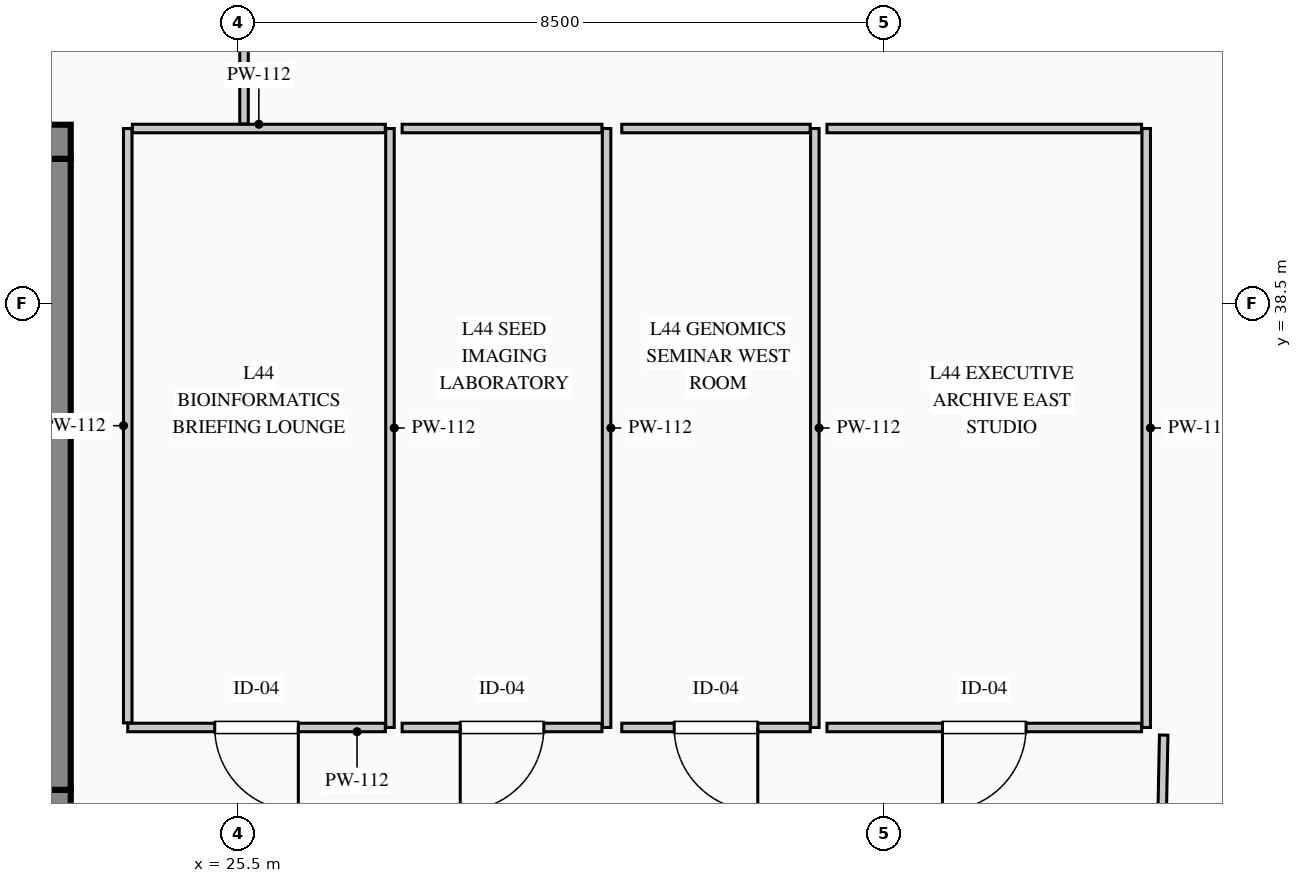
"""IFC4 building model, lengths in metres.
Left out: names, types, materials, properties, quantities, classifications, styles, units other than length and angle.
Written with IfcOpenShell. Run it as: python <this file> out.ifc"""

import sys

from ifc_helpers import new_model, si_unit, direction, frame, frame_2d, origin, place, context, subcontext, project, spatial, rectangle, extrude, element, fill, save


model = new_model("IFC4")
c1 = context("Model", 3, precision=1e-05, world=origin(), true_north=direction((0.0, 1.0)))
c2 = subcontext(c1, "Body", "Model", "MODEL_VIEW")
j1 = project(units=[si_unit("LENGTHUNIT", "METRE"), si_unit("PLANEANGLEUNIT", "RADIAN")], contexts=[c1])
p1 = place(None, origin())
s1 = spatial("IfcSite", under=j1, at=p1, CompositionType="ELEMENT")
p2 = place(p1, origin())
s2 = spatial("IfcBuilding", under=s1, at=p2, CompositionType="ELEMENT")
p3 = place(p2, frame((0.0, 0.0, 187.7)))
s3 = spatial("IfcBuildingStorey", under=s2, at=p3, CompositionType="ELEMENT", Elevation=187.7)
p4 = place(p3, frame((5.55, 40.625, 0.0), z_axis=(0.0, 0.0, 1.0), x_axis=(1.0, 0.0, 0.0)))
e1 = element("IfcWall", 1, at=p4, inside=s3, PredefinedType="SHEAR", context=c2, shape_type="SweptSolid", body=[
    extrude(rectangle(XDim=17.75, YDim=0.45, at=frame_2d((8.875, 0.0))), origin(), (0.0, 0.0, 1.0), 3.95),
])
p5 = place(p4, frame((15.895, 0.0, 0.0)))
e2 = element("IfcOpeningElement", 2, at=p5, cuts=e1, PredefinedType="OPENING", context=c2, shape_type="SweptSolid", body=[
    extrude(rectangle(XDim=1.18, YDim=2.25, at=frame_2d((0.59, 1.125))), frame((0.0, 0.235, 0.0), z_axis=(0.0, -1.0, 0.0), x_axis=(1.0, 0.0, 0.0)), (0.0, 0.0, 1.0), 0.47),
])
p6 = place(p3, frame((5.55, 31.875, 0.0), z_axis=(0.0, 0.0, 1.0), x_axis=(1.0, 0.0, 0.0)))
e3 = element("IfcWall", 3, at=p6, inside=s3, PredefinedType="SHEAR", context=c2, shape_type="SweptSolid", body=[
    extrude(rectangle(XDim=17.75, YDim=0.45, at=frame_2d((8.875, 0.0))), origin(), (0.0, 0.0, 1.0), 3.95),
])
p7 = place(p6, frame((3.1, 0.0, 0.0)))
e4 = element("IfcOpeningElement", 4, at=p7, cuts=e3, PredefinedType="OPENING", context=c2, shape_type="SweptSolid", body=[
    extrude(rectangle(XDim=1.2, YDim=2.2, at=frame_2d((0.6, 1.1))), frame((0.0, 0.235, 0.0), z_axis=(0.0, -1.0, 0.0), x_axis=(1.0, 0.0, 0.0)), (0.0, 0.0, 1.0), 0.47),
])
p8 = place(p6, frame((6.95, 0.0, 0.0)))
e5 = element("IfcOpeningElement", 5, at=p8, cuts=e3, PredefinedType="OPENING", context=c2, shape_type="SweptSolid", body=[
    extrude(rectangle(XDim=1.2, YDim=2.2, at=frame_2d((0.6, 1.1))), frame((0.0, 0.235, 0.0), z_axis=(0.0, -1.0, 0.0), x_axis=(1.0, 0.0, 0.0)), (0.0, 0.0, 1.0), 0.47),
])
p9 = place(p6, frame((8.8, 0.0, 0.0)))
e6 = element("IfcOpeningElement", 6, at=p9, cuts=e3, PredefinedType="OPENING", context=c2, shape_type="SweptSolid", body=[
    extrude(rectangle(XDim=1.15, YDim=2.2, at=frame_2d((0.575, 1.1))), frame((0.0, 0.235, 0.0), z_axis=(0.0, -1.0, 0.0), x_axis=(1.0, 0.0, 0.0)), (0.0, 0.0, 1.0), 0.47),
])
p10 = place(p6, frame((15.9, 0.0, 0.0)))
e7 = element("IfcOpeningElement", 7, at=p10, cuts=e3, PredefinedType="OPENING", context=c2, shape_type="SweptSolid", body=[
    extrude(rectangle(XDim=1.2, YDim=2.2, at=frame_2d((0.6, 1.1))), frame((0.0, 0.235, 0.0), z_axis=(0.0, -1.0, 0.0), x_axis=(1.0, 0.0, 0.0)), (0.0, 0.0, 1.0), 0.47),
])
p11 = place(p3, frame((23.075, 32.1, 0.0), z_axis=(0.0, 0.0, 1.0), x_axis=(0.0, 1.0, 0.0)))
e8 = element("IfcWall", 8, at=p11, inside=s3, PredefinedType="SHEAR", context=c2, shape_type="SweptSolid", body=[
    extrude(rectangle(XDim=8.3, YDim=0.45, at=frame_2d((4.15, 0.0))), origin(), (0.0, 0.0, 1.0), 3.95),
])
p12 = place(p3, frame((27.5, 40.8, 0.0), z_axis=(0.0, 0.0, 1.0), x_axis=(0.0, -1.0, 0.0)))
e9 = element("IfcWall", 9, at=p12, inside=s3, PredefinedType="PARTITIONING", context=c2, shape_type="SweptSolid", body=[
    extrude(rectangle(XDim=7.88, YDim=0.112, at=frame_2d((3.94, 0.0))), origin(), (0.0, 0.0, 1.0), 3.7),
])
p13 = place(p3, frame((27.439, 32.92, 0.0), z_axis=(0.0, 0.0, 1.0), x_axis=(-1.0, 0.0, 0.0)))
e10 = element("IfcWall", 10, at=p13, inside=s3, PredefinedType="PARTITIONING", context=c2, shape_type="SweptSolid", body=[
    extrude(rectangle(XDim=3.389, YDim=0.112, at=frame_2d((1.694, 0.0))), origin(), (0.0, 0.0, 1.0), 3.7),
])
p14 = place(p13, frame((1.145, 0.0, 0.0)))
e11 = element("IfcOpeningElement", 11, at=p14, cuts=e10, PredefinedType="OPENING", context=c2, shape_type="SweptSolid", body=[
    extrude(rectangle(XDim=1.1, YDim=2.2, at=frame_2d((0.55, 1.1))), frame((0.0, 0.066, 0.0), z_axis=(0.0, -1.0, 0.0), x_axis=(1.0, 0.0, 0.0)), (0.0, 0.0, 1.0), 0.132),
])
p15 = place(p3, frame((24.05, 32.981, 0.0), z_axis=(0.0, 0.0, 1.0), x_axis=(0.0, 1.0, 0.0)))
e12 = element("IfcWall", 12, at=p15, inside=s3, PredefinedType="PARTITIONING", context=c2, shape_type="SweptSolid", body=[
    extrude(rectangle(XDim=7.819, YDim=0.112, at=frame_2d((3.91, 0.0))), origin(), (0.0, 0.0, 1.0), 3.7),
])
p16 = place(p3, frame((24.111, 40.8, 0.0), z_axis=(0.0, 0.0, 1.0), x_axis=(1.0, 0.0, 0.0)))
e13 = element("IfcWall", 13, at=p16, inside=s3, PredefinedType="PARTITIONING", context=c2, shape_type="SweptSolid", body=[
    extrude(rectangle(XDim=3.328, YDim=0.112, at=frame_2d((1.664, 0.0))), origin(), (0.0, 0.0, 1.0), 3.7),
])
p17 = place(p3, frame((30.35, 40.8, 0.0), z_axis=(0.0, 0.0, 1.0), x_axis=(0.0, -1.0, 0.0)))
e14 = element("IfcWall", 14, at=p17, inside=s3, PredefinedType="PARTITIONING", context=c2, shape_type="SweptSolid", body=[
    extrude(rectangle(XDim=7.88, YDim=0.112, at=frame_2d((3.94, 0.0))), origin(), (0.0, 0.0, 1.0), 3.7),
])
p18 = place(p3, frame((30.289, 32.92, 0.0), z_axis=(0.0, 0.0, 1.0), x_axis=(-1.0, 0.0, 0.0)))
e15 = element("IfcWall", 15, at=p18, inside=s3, PredefinedType="PARTITIONING", context=c2, shape_type="SweptSolid", body=[
    extrude(rectangle(XDim=2.629, YDim=0.112, at=frame_2d((1.314, 0.0))), origin(), (0.0, 0.0, 1.0), 3.7),
])
p19 = place(p18, frame((0.764, 0.0, 0.0)))
e16 = element("IfcOpeningElement", 16, at=p19, cuts=e15, PredefinedType="OPENING", context=c2, shape_type="SweptSolid", body=[
    extrude(rectangle(XDim=1.1, YDim=2.2, at=frame_2d((0.55, 1.1))), frame((0.0, 0.066, 0.0), z_axis=(0.0, -1.0, 0.0), x_axis=(1.0, 0.0, 0.0)), (0.0, 0.0, 1.0), 0.132),
])
p20 = place(p3, frame((27.66, 40.8, 0.0), z_axis=(0.0, 0.0, 1.0), x_axis=(1.0, 0.0, 0.0)))
e17 = element("IfcWall", 17, at=p20, inside=s3, PredefinedType="PARTITIONING", context=c2, shape_type="SweptSolid", body=[
    extrude(rectangle(XDim=2.629, YDim=0.112, at=frame_2d((1.314, 0.0))), origin(), (0.0, 0.0, 1.0), 3.7),
])
p21 = place(p3, frame((33.09, 40.8, 0.0), z_axis=(0.0, 0.0, 1.0), x_axis=(0.0, -1.0, 0.0)))
e18 = element("IfcWall", 18, at=p21, inside=s3, PredefinedType="PARTITIONING", context=c2, shape_type="SweptSolid", body=[
    extrude(rectangle(XDim=7.88, YDim=0.112, at=frame_2d((3.94, 0.0))), origin(), (0.0, 0.0, 1.0), 3.7),
])
p22 = place(p3, frame((33.029, 32.92, 0.0), z_axis=(0.0, 0.0, 1.0), x_axis=(-1.0, 0.0, 0.0)))
e19 = element("IfcWall", 19, at=p22, inside=s3, PredefinedType="PARTITIONING", context=c2, shape_type="SweptSolid", body=[
    extrude(rectangle(XDim=2.479, YDim=0.112, at=frame_2d((1.24, 0.0))), origin(), (0.0, 0.0, 1.0), 3.7),
])
p23 = place(p22, frame((0.689, 0.0, 0.0)))
e20 = element("IfcOpeningElement", 20, at=p23, cuts=e19, PredefinedType="OPENING", context=c2, shape_type="SweptSolid", body=[
    extrude(rectangle(XDim=1.1, YDim=2.2, at=frame_2d((0.55, 1.1))), frame((0.0, 0.066, 0.0), z_axis=(0.0, -1.0, 0.0), x_axis=(1.0, 0.0, 0.0)), (0.0, 0.0, 1.0), 0.132),
])
p24 = place(p3, frame((30.55, 40.8, 0.0), z_axis=(0.0, 0.0, 1.0), x_axis=(1.0, 0.0, 0.0)))
e21 = element("IfcWall", 21, at=p24, inside=s3, PredefinedType="PARTITIONING", context=c2, shape_type="SweptSolid", body=[
    extrude(rectangle(XDim=2.479, YDim=0.112, at=frame_2d((1.24, 0.0))), origin(), (0.0, 0.0, 1.0), 3.7),
])
p25 = place(p3, frame((37.45, 40.8, 0.0), z_axis=(0.0, 0.0, 1.0), x_axis=(0.0, -1.0, 0.0)))
e22 = element("IfcWall", 22, at=p25, inside=s3, PredefinedType="PARTITIONING", context=c2, shape_type="SweptSolid", body=[
    extrude(rectangle(XDim=7.88, YDim=0.112, at=frame_2d((3.94, 0.0))), origin(), (0.0, 0.0, 1.0), 3.7),
])
p26 = place(p3, frame((37.389, 32.92, 0.0), z_axis=(0.0, 0.0, 1.0), x_axis=(-1.0, 0.0, 0.0)))
e23 = element("IfcWall", 23, at=p26, inside=s3, PredefinedType="PARTITIONING", context=c2, shape_type="SweptSolid", body=[
    extrude(rectangle(XDim=4.139, YDim=0.112, at=frame_2d((2.069, 0.0))), origin(), (0.0, 0.0, 1.0), 3.7),
])
p27 = place(p26, frame((1.52, 0.0, 0.0)))
e24 = element("IfcOpeningElement", 24, at=p27, cuts=e23, PredefinedType="OPENING", context=c2, shape_type="SweptSolid", body=[
    extrude(rectangle(XDim=1.1, YDim=2.2, at=frame_2d((0.55, 1.1))), frame((0.0, 0.066, 0.0), z_axis=(0.0, -1.0, 0.0), x_axis=(1.0, 0.0, 0.0)), (0.0, 0.0, 1.0), 0.132),
])
p28 = place(p3, frame((33.25, 40.8, 0.0), z_axis=(0.0, 0.0, 1.0), x_axis=(1.0, 0.0, 0.0)))
e25 = element("IfcWall", 25, at=p28, inside=s3, PredefinedType="PARTITIONING", context=c2, shape_type="SweptSolid", body=[
    extrude(rectangle(XDim=4.139, YDim=0.112, at=frame_2d((2.069, 0.0))), origin(), (0.0, 0.0, 1.0), 3.7),
])
p29 = place(p3, frame((37.599, 28.691, 0.0), z_axis=(0.0, 0.0, 1.0), x_axis=(0.019566997539, 0.999808547977, 0.0)))
e26 = element("IfcWall", 26, at=p29, inside=s3, PredefinedType="PARTITIONING", context=c2, shape_type="SweptSolid", body=[
    extrude(rectangle(XDim=4.13, YDim=0.112, at=frame_2d((2.065, 0.0))), origin(), (0.0, 0.0, 1.0), 3.7),
])
p30 = place(p29, frame((1.515, 0.0, 0.0)))
e27 = element("IfcOpeningElement", 27, at=p30, cuts=e26, PredefinedType="OPENING", context=c2, shape_type="SweptSolid", body=[
    extrude(rectangle(XDim=1.1, YDim=2.2, at=frame_2d((0.55, 1.1))), frame((0.0, 0.066, 0.0), z_axis=(0.0, -1.0, 0.0), x_axis=(1.0, 0.0, 0.0)), (0.0, 0.0, 1.0), 0.132),
])
p31 = place(p3, frame((25.58, 40.861, 0.0), z_axis=(0.0, 0.0, 1.0), x_axis=(0.0, 1.0, 0.0)))
e28 = element("IfcWall", 28, at=p31, inside=s3, PredefinedType="PARTITIONING", context=c2, shape_type="SweptSolid", body=[
    extrude(rectangle(XDim=2.374, YDim=0.112, at=frame_2d((1.187, 0.0))), origin(), (0.0, 0.0, 1.0), 3.7),
])
p32 = place(p14, origin())
e29 = element("IfcDoor", 29, at=p32, inside=s3, OperationType="SINGLE_SWING_LEFT", PredefinedType="DOOR", context=c2, shape_type="SweptSolid", body=[
    extrude(rectangle(XDim=1.1, YDim=2.2, at=frame_2d((0.55, 1.1))), frame((0.0, 0.025, 0.0), z_axis=(0.0, -1.0, 0.0), x_axis=(1.0, 0.0, 0.0)), (0.0, 0.0, 1.0), 0.05),
])
fill(e11, e29)
p33 = place(p19, origin())
e30 = element("IfcDoor", 30, at=p33, inside=s3, OperationType="SINGLE_SWING_RIGHT", PredefinedType="DOOR", context=c2, shape_type="SweptSolid", body=[
    extrude(rectangle(XDim=1.1, YDim=2.2, at=frame_2d((0.55, 1.1))), frame((0.0, 0.025, 0.0), z_axis=(0.0, -1.0, 0.0), x_axis=(1.0, 0.0, 0.0)), (0.0, 0.0, 1.0), 0.05),
])
fill(e16, e30)
p34 = place(p23, origin())
e31 = element("IfcDoor", 31, at=p34, inside=s3, OperationType="SINGLE_SWING_LEFT", PredefinedType="DOOR", context=c2, shape_type="SweptSolid", body=[
    extrude(rectangle(XDim=1.1, YDim=2.2, at=frame_2d((0.55, 1.1))), frame((0.0, 0.025, 0.0), z_axis=(0.0, -1.0, 0.0), x_axis=(1.0, 0.0, 0.0)), (0.0, 0.0, 1.0), 0.05),
])
fill(e20, e31)
p35 = place(p27, origin())
e32 = element("IfcDoor", 32, at=p35, inside=s3, OperationType="SINGLE_SWING_RIGHT", PredefinedType="DOOR", context=c2, shape_type="SweptSolid", body=[
    extrude(rectangle(XDim=1.1, YDim=2.2, at=frame_2d((0.55, 1.1))), frame((0.0, 0.025, 0.0), z_axis=(0.0, -1.0, 0.0), x_axis=(1.0, 0.0, 0.0)), (0.0, 0.0, 1.0), 0.05),
])
fill(e24, e32)
save(model, sys.argv[1])
